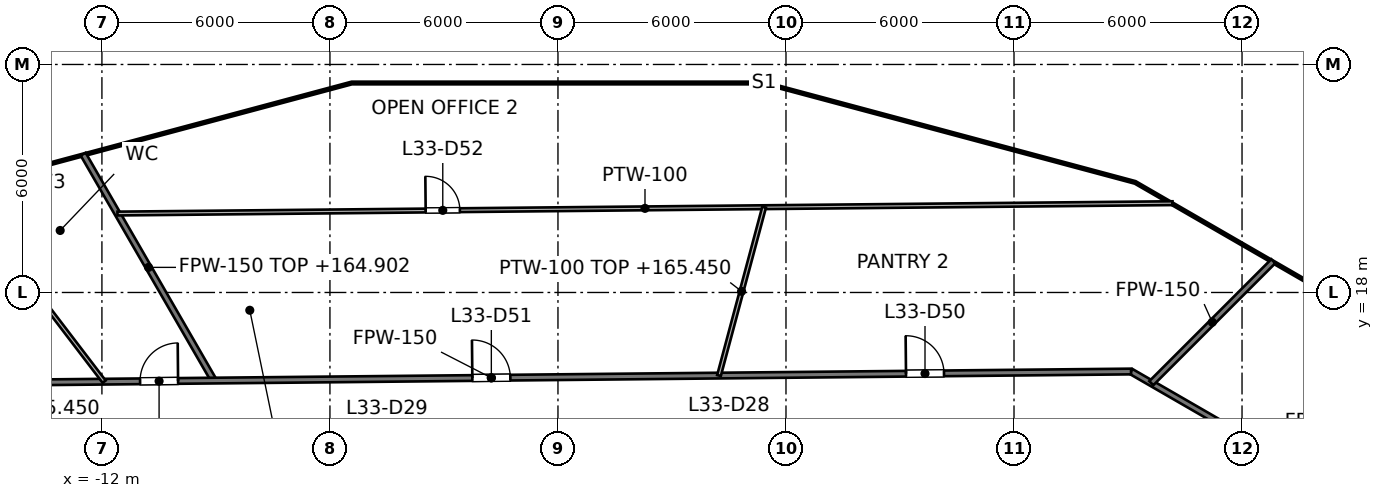
"""IFC4 building model, lengths in metres.
Left out: names, types, materials, properties, quantities, classifications, styles, units other than length and angle.
Written with IfcOpenShell. Run it as: python <this file> out.ifc"""

import sys

from ifc_helpers import new_model, si_unit, direction, frame, frame_2d, origin, place, context, subcontext, project, spatial, rectangle, extrude, element, fill, save


model = new_model("IFC4")
c1 = context("Model", 3, precision=1e-05, world=origin(), true_north=direction((0.0, 1.0)))
c2 = subcontext(c1, "Body", "Model", "MODEL_VIEW")
j1 = project(units=[si_unit("LENGTHUNIT", "METRE"), si_unit("PLANEANGLEUNIT", "RADIAN")], contexts=[c1])
p1 = place(None, origin())
s1 = spatial("IfcSite", under=j1, at=p1, CompositionType="ELEMENT")
p2 = place(p1, origin())
s2 = spatial("IfcBuilding", under=s1, at=p2, CompositionType="ELEMENT")
p3 = place(p2, frame((0.0, 0.0, 161.6)))
s3 = spatial("IfcBuildingStorey", under=s2, at=p3, CompositionType="ELEMENT", Elevation=161.6)
p4 = place(p3, frame((-12.493, 21.639, 0.0), z_axis=(0.0, 0.0, 1.0), x_axis=(0.500006143547, -0.866021856777, 0.0)))
e1 = element("IfcWall", 1, at=p4, inside=s3, PredefinedType="PARTITIONING", context=c2, shape_type="SweptSolid", body=[
    extrude(rectangle(XDim=6.878, YDim=0.15, at=frame_2d((3.439, 0.0))), origin(), (0.0, 0.0, 1.0), 3.302),
])
p5 = place(p3, frame((15.08, 15.921, 0.0), z_axis=(0.0, 0.0, 1.0), x_axis=(0.865982112089, -0.50007497592, 0.0)))
e2 = element("IfcWall", 2, at=p5, inside=s3, PredefinedType="PARTITIONING", context=c2, shape_type="SweptSolid", body=[
    extrude(rectangle(XDim=8.613, YDim=0.15, at=frame_2d((4.306, 0.0))), origin(), (0.0, 0.0, 1.0), 2.927),
])
p6 = place(p3, frame((-18.587, 15.587, 0.0), z_axis=(0.0, 0.0, 1.0), x_axis=(0.999950941879, 0.009905242833, 0.0)))
e3 = element("IfcWall", 3, at=p6, inside=s3, PredefinedType="PARTITIONING", context=c2, shape_type="SweptSolid", body=[
    extrude(rectangle(XDim=33.669, YDim=0.15, at=frame_2d((16.834, 0.0))), origin(), (0.0, 0.0, 1.0), 2.927),
])
p7 = place(p6, frame((7.592, 0.0, 0.0)))
e4 = element("IfcOpeningElement", 4, at=p7, cuts=e3, PredefinedType="OPENING", context=c2, shape_type="SweptSolid", body=[
    extrude(rectangle(XDim=1.0, YDim=2.1, at=frame_2d((0.5, 1.05))), frame((0.0, 0.075, 0.0), z_axis=(0.0, -1.0, 0.0), x_axis=(1.0, 0.0, 0.0)), (0.0, 0.0, 1.0), 0.15),
])
p8 = place(p6, frame((27.746, 0.0, 0.0)))
e5 = element("IfcOpeningElement", 5, at=p8, cuts=e3, PredefinedType="OPENING", context=c2, shape_type="SweptSolid", body=[
    extrude(rectangle(XDim=1.0, YDim=2.1, at=frame_2d((0.5, 1.05))), frame((0.0, 0.075, 0.0), z_axis=(0.0, -1.0, 0.0), x_axis=(1.0, 0.0, 0.0)), (0.0, 0.0, 1.0), 0.15),
])
p9 = place(p6, frame((16.335, 0.0, 0.0)))
e6 = element("IfcOpeningElement", 6, at=p9, cuts=e3, PredefinedType="OPENING", context=c2, shape_type="SweptSolid", body=[
    extrude(rectangle(XDim=1.0, YDim=2.1, at=frame_2d((0.5, 1.05))), frame((0.0, 0.075, 0.0), z_axis=(0.0, -1.0, 0.0), x_axis=(1.0, 0.0, 0.0)), (0.0, 0.0, 1.0), 0.15),
])
p10 = place(p3, frame((15.613, 15.613, 0.0), z_axis=(0.0, 0.0, 1.0), x_axis=(0.707106781187, 0.707106781187, 0.0)))
e7 = element("IfcWall", 7, at=p10, inside=s3, PredefinedType="PARTITIONING", context=c2, shape_type="SweptSolid", body=[
    extrude(rectangle(XDim=4.538, YDim=0.15, at=frame_2d((2.269, 0.0))), origin(), (0.0, 0.0, 1.0), 2.927),
])
p11 = place(p3, frame((-15.289, 20.04, 0.0), z_axis=(0.0, 0.0, 1.0), x_axis=(0.606584285527, -0.795019185021, 0.0)))
e8 = element("IfcWall", 8, at=p11, inside=s3, PredefinedType="PARTITIONING", context=c2, shape_type="SweptSolid", body=[
    extrude(rectangle(XDim=5.518, YDim=0.1, at=frame_2d((2.759, 0.0))), origin(), (0.0, 0.0, 1.0), 3.85),
])
p12 = place(p3, frame((-11.591, 20.077, 0.0), z_axis=(0.0, 0.0, 1.0), x_axis=(0.999951585171, 0.009840087095, 0.0)))
e9 = element("IfcWall", 9, at=p12, inside=s3, PredefinedType="PARTITIONING", context=c2, shape_type="SweptSolid", body=[
    extrude(rectangle(XDim=27.763, YDim=0.1, at=frame_2d((13.882, 0.0))), origin(), (0.0, 0.0, 1.0), 2.927),
])
p13 = place(p12, frame((8.11, 0.0, 0.0)))
e10 = element("IfcOpeningElement", 10, at=p13, cuts=e9, PredefinedType="OPENING", context=c2, shape_type="SweptSolid", body=[
    extrude(rectangle(XDim=0.9, YDim=2.1, at=frame_2d((0.45, 1.05))), frame((0.0, 0.05, 0.0), z_axis=(0.0, -1.0, 0.0), x_axis=(1.0, 0.0, 0.0)), (0.0, 0.0, 1.0), 0.1),
])
p14 = place(p3, frame((4.237, 15.814, 0.0), z_axis=(0.0, 0.0, 1.0), x_axis=(0.258900971347, 0.965903870494, 0.0)))
e11 = element("IfcWall", 11, at=p14, inside=s3, PredefinedType="PARTITIONING", context=c2, shape_type="SweptSolid", body=[
    extrude(rectangle(XDim=4.589, YDim=0.1, at=frame_2d((2.294, 0.0))), origin(), (0.0, 0.0, 1.0), 3.85),
])
p15 = place(p7, origin())
e12 = element("IfcDoor", 12, at=p15, inside=s3, OperationType="SINGLE_SWING_RIGHT", PredefinedType="DOOR", context=c2, shape_type="SweptSolid", body=[
    extrude(rectangle(XDim=1.0, YDim=2.1, at=frame_2d((0.5, 1.05))), frame((0.0, 0.025, 0.0), z_axis=(0.0, -1.0, 0.0), x_axis=(1.0, 0.0, 0.0)), (0.0, 0.0, 1.0), 0.05),
])
fill(e4, e12)
p16 = place(p8, origin())
e13 = element("IfcDoor", 13, at=p16, inside=s3, OperationType="SINGLE_SWING_LEFT", PredefinedType="DOOR", context=c2, shape_type="SweptSolid", body=[
    extrude(rectangle(XDim=1.0, YDim=2.1, at=frame_2d((0.5, 1.05))), frame((0.0, 0.025, 0.0), z_axis=(0.0, -1.0, 0.0), x_axis=(1.0, 0.0, 0.0)), (0.0, 0.0, 1.0), 0.05),
])
fill(e5, e13)
p17 = place(p9, origin())
e14 = element("IfcDoor", 14, at=p17, inside=s3, OperationType="SINGLE_SWING_LEFT", PredefinedType="DOOR", context=c2, shape_type="SweptSolid", body=[
    extrude(rectangle(XDim=1.0, YDim=2.1, at=frame_2d((0.5, 1.05))), frame((0.0, 0.025, 0.0), z_axis=(0.0, -1.0, 0.0), x_axis=(1.0, 0.0, 0.0)), (0.0, 0.0, 1.0), 0.05),
])
fill(e6, e14)
p18 = place(p13, origin())
e15 = element("IfcDoor", 15, at=p18, inside=s3, OperationType="SINGLE_SWING_LEFT", PredefinedType="DOOR", context=c2, shape_type="SweptSolid", body=[
    extrude(rectangle(XDim=0.9, YDim=2.1, at=frame_2d((0.45, 1.05))), frame((0.0, 0.025, 0.0), z_axis=(0.0, -1.0, 0.0), x_axis=(1.0, 0.0, 0.0)), (0.0, 0.0, 1.0), 0.05),
])
fill(e10, e15)
save(model, sys.argv[1])
